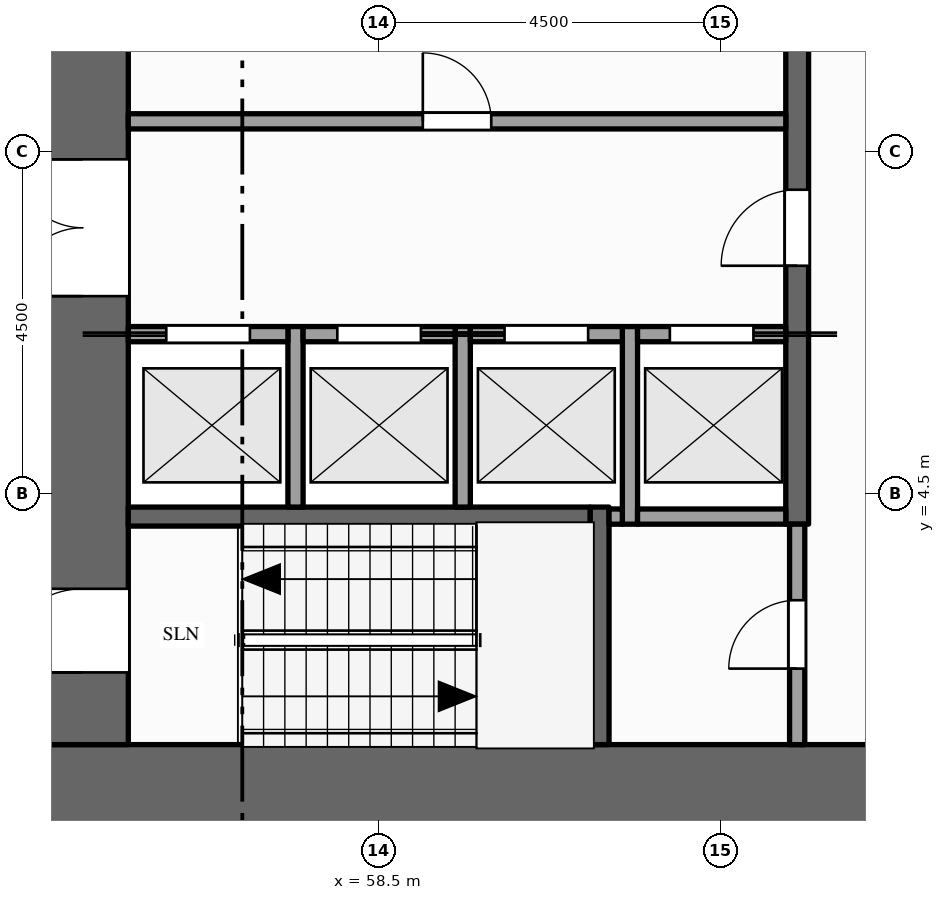
"""IFC4 building model, lengths in metres.
Left out: names, types, materials, properties, quantities, classifications, styles, units other than length and angle.
Written with IfcOpenShell. Run it as: python <this file> out.ifc"""

import sys

from ifc_helpers import new_model, si_unit, direction, frame, frame_2d, origin, place, context, subcontext, project, spatial, rectangle, extrude, element, fill, save


model = new_model("IFC4")
c1 = context("Model", 3, precision=1e-05, world=origin(), true_north=direction((0.0, 1.0)))
c2 = subcontext(c1, "Body", "Model", "MODEL_VIEW")
j1 = project(units=[si_unit("LENGTHUNIT", "METRE"), si_unit("PLANEANGLEUNIT", "RADIAN")], contexts=[c1])
p1 = place(None, origin())
s1 = spatial("IfcSite", under=j1, at=p1, CompositionType="ELEMENT")
p2 = place(p1, origin())
s2 = spatial("IfcBuilding", under=s1, at=p2, CompositionType="ELEMENT")
p3 = place(p2, frame((0.0, 0.0, 107.0)))
s3 = spatial("IfcBuildingStorey", under=s2, at=p3, CompositionType="ELEMENT", Elevation=107.0)
p4 = place(p3, frame((67.5, 0.6, -0.15), z_axis=(0.0, 0.0, 1.0), x_axis=(-1.0, 0.0, 0.0)))
e1 = element("IfcWall", 1, at=p4, inside=s3, PredefinedType="SHEAR", context=c2, shape_type="SweptSolid", body=[
    extrude(rectangle(XDim=13.5, YDim=1.2, at=frame_2d((6.75, 0.0))), origin(), (0.0, 0.0, 1.0), 4.0),
])
p5 = place(p3, frame((54.6, 1.2, -0.15), z_axis=(0.0, 0.0, 1.0), x_axis=(0.0, 1.0, 0.0)))
e2 = element("IfcWall", 2, at=p5, inside=s3, PredefinedType="SHEAR", context=c2, shape_type="SweptSolid", body=[
    extrude(rectangle(XDim=20.1, YDim=1.2, at=frame_2d((10.05, 0.0))), origin(), (0.0, 0.0, 1.0), 4.0),
])
p6 = place(p5, frame((5.9, 0.0, 0.15)))
e3 = element("IfcOpeningElement", 3, at=p6, cuts=e2, PredefinedType="OPENING", context=c2, shape_type="SweptSolid", body=[
    extrude(rectangle(XDim=1.8, YDim=2.1, at=frame_2d((0.9, 1.05))), frame((0.0, 0.61, 0.0), z_axis=(0.0, -1.0, 0.0), x_axis=(1.0, 0.0, 0.0)), (0.0, 0.0, 1.0), 1.22),
])
p7 = place(p5, frame((11.95, 0.0, 0.15)))
e4 = element("IfcOpeningElement", 4, at=p7, cuts=e2, PredefinedType="OPENING", context=c2, shape_type="SweptSolid", body=[
    extrude(rectangle(XDim=1.1, YDim=2.1, at=frame_2d((0.55, 1.05))), frame((0.0, 0.61, 0.0), z_axis=(0.0, -1.0, 0.0), x_axis=(1.0, 0.0, 0.0)), (0.0, 0.0, 1.0), 1.22),
])
p8 = place(p5, frame((0.95, 0.0, 0.15)))
e5 = element("IfcOpeningElement", 5, at=p8, cuts=e2, PredefinedType="OPENING", context=c2, shape_type="SweptSolid", body=[
    extrude(rectangle(XDim=1.1, YDim=2.1, at=frame_2d((0.55, 1.05))), frame((0.0, 0.61, 0.0), z_axis=(0.0, -1.0, 0.0), x_axis=(1.0, 0.0, 0.0)), (0.0, 0.0, 1.0), 1.22),
])
p9 = place(p5, frame((18.15, 0.0, 0.15)))
e6 = element("IfcOpeningElement", 6, at=p9, cuts=e2, PredefinedType="OPENING", context=c2, shape_type="SweptSolid", body=[
    extrude(rectangle(XDim=1.1, YDim=2.1, at=frame_2d((0.55, 1.05))), frame((0.0, 0.61, 0.0), z_axis=(0.0, -1.0, 0.0), x_axis=(1.0, 0.0, 0.0)), (0.0, 0.0, 1.0), 1.22),
])
for number, where, z_axis, x_axis in (
    (7, (57.4, 4.325, 0.0), (0.0, 0.0, 1.0), (0.0, 1.0, 0.0)),
    (8, (59.6, 4.325, 0.0), (0.0, 0.0, 1.0), (0.0, 1.0, 0.0)),
):
    element("IfcWall", number, at=place(p3, frame(where, z_axis=z_axis, x_axis=x_axis)), inside=s3, PredefinedType="SOLIDWALL", context=c2, shape_type="SweptSolid", body=[
        extrude(rectangle(XDim=2.375, YDim=0.2, at=frame_2d((1.188, 0.0))), origin(), (0.0, 0.0, 1.0), 3.85),
    ])
p10 = place(p3, frame((61.4, 1.2, 0.0), z_axis=(0.0, 0.0, 1.0), x_axis=(0.0, 1.0, 0.0)))
e9 = element("IfcWall", 9, at=p10, inside=s3, PredefinedType="SHEAR", context=c2, shape_type="SweptSolid", body=[
    extrude(rectangle(XDim=3.125, YDim=0.25, at=frame_2d((1.562, 0.0))), origin(), (0.0, 0.0, 1.0), 3.85),
])
p11 = place(p3, frame((61.8, 4.1, 0.0), z_axis=(0.0, 0.0, 1.0), x_axis=(0.0, 1.0, 0.0)))
e10 = element("IfcWall", 10, at=p11, inside=s3, PredefinedType="SOLIDWALL", context=c2, shape_type="SweptSolid", body=[
    extrude(rectangle(XDim=2.6, YDim=0.2, at=frame_2d((1.3, 0.0))), origin(), (0.0, 0.0, 1.0), 3.85),
])
p12 = place(p3, frame((64.0, 1.2, 0.0), z_axis=(0.0, 0.0, 1.0), x_axis=(0.0, 1.0, 0.0)))
e11 = element("IfcWall", 11, at=p12, inside=s3, PredefinedType="PARTITIONING", context=c2, shape_type="SweptSolid", body=[
    extrude(rectangle(XDim=2.9, YDim=0.2, at=frame_2d((1.45, 0.0))), origin(), (0.0, 0.0, 1.0), 3.85),
])
p13 = place(p12, frame((1.0, 0.0, 0.0)))
e12 = element("IfcOpeningElement", 12, at=p13, cuts=e11, PredefinedType="OPENING", context=c2, shape_type="SweptSolid", body=[
    extrude(rectangle(XDim=0.9, YDim=2.1, at=frame_2d((0.45, 1.05))), frame((0.0, 0.11, 0.0), z_axis=(0.0, -1.0, 0.0), x_axis=(1.0, 0.0, 0.0)), (0.0, 0.0, 1.0), 0.22),
])
p14 = place(p3, frame((64.0, 4.1, 0.0), z_axis=(0.0, 0.0, 1.0), x_axis=(0.0, 1.0, 0.0)))
e13 = element("IfcWall", 13, at=p14, inside=s3, PredefinedType="SHEAR", context=c2, shape_type="SweptSolid", body=[
    extrude(rectangle(XDim=14.5, YDim=0.3, at=frame_2d((7.25, 0.0))), origin(), (0.0, 0.0, 1.0), 3.85),
])
p15 = place(p14, frame((3.4, 0.0, 0.0)))
e14 = element("IfcOpeningElement", 14, at=p15, cuts=e13, PredefinedType="OPENING", context=c2, shape_type="SweptSolid", body=[
    extrude(rectangle(XDim=1.0, YDim=2.1, at=frame_2d((0.5, 1.05))), frame((0.0, 0.16, 0.0), z_axis=(0.0, -1.0, 0.0), x_axis=(1.0, 0.0, 0.0)), (0.0, 0.0, 1.0), 0.32),
])
p16 = place(p14, frame((9.1, 0.0, 0.0)))
e15 = element("IfcOpeningElement", 15, at=p16, cuts=e13, PredefinedType="OPENING", context=c2, shape_type="SweptSolid", body=[
    extrude(rectangle(XDim=1.0, YDim=2.1, at=frame_2d((0.5, 1.05))), frame((0.0, 0.16, 0.0), z_axis=(0.0, -1.0, 0.0), x_axis=(1.0, 0.0, 0.0)), (0.0, 0.0, 1.0), 0.32),
])
p17 = place(p3, frame((55.2, 4.2, 0.0), z_axis=(0.0, 0.0, 1.0), x_axis=(1.0, 0.0, 0.0)))
e16 = element("IfcWall", 16, at=p17, inside=s3, PredefinedType="SHEAR", context=c2, shape_type="SweptSolid", body=[
    extrude(rectangle(XDim=6.075, YDim=0.25, at=frame_2d((3.038, 0.0))), origin(), (0.0, 0.0, 1.0), 3.85),
])
p18 = place(p3, frame((61.525, 4.2, 0.0), z_axis=(0.0, 0.0, 1.0), x_axis=(1.0, 0.0, 0.0)))
e17 = element("IfcWall", 17, at=p18, inside=s3, PredefinedType="SOLIDWALL", context=c2, shape_type="SweptSolid", body=[
    extrude(rectangle(XDim=0.175, YDim=0.2, at=frame_2d((0.087, 0.0))), origin(), (0.0, 0.0, 1.0), 3.85),
])
p19 = place(p3, frame((61.9, 4.2, 0.0), z_axis=(0.0, 0.0, 1.0), x_axis=(1.0, 0.0, 0.0)))
e18 = element("IfcWall", 18, at=p19, inside=s3, PredefinedType="SOLIDWALL", context=c2, shape_type="SweptSolid", body=[
    extrude(rectangle(XDim=1.95, YDim=0.2, at=frame_2d((0.975, 0.0))), origin(), (0.0, 0.0, 1.0), 3.85),
])
p20 = place(p3, frame((55.2, 6.6, 0.0), z_axis=(0.0, 0.0, 1.0), x_axis=(1.0, 0.0, 0.0)))
e19 = element("IfcWall", 19, at=p20, inside=s3, PredefinedType="SOLIDWALL", context=c2, shape_type="SweptSolid", body=[
    extrude(rectangle(XDim=2.1, YDim=0.2, at=frame_2d((1.05, 0.0))), origin(), (0.0, 0.0, 1.0), 3.85),
])
p21 = place(p20, frame((0.5, 0.0, 0.012)))
e20 = element("IfcOpeningElement", 20, at=p21, cuts=e19, PredefinedType="OPENING", context=c2, shape_type="SweptSolid", body=[
    extrude(rectangle(XDim=1.1, YDim=2.1, at=frame_2d((0.55, 1.05))), frame((0.0, 0.11, 0.0), z_axis=(0.0, -1.0, 0.0), x_axis=(1.0, 0.0, 0.0)), (0.0, 0.0, 1.0), 0.22),
])
p22 = place(p3, frame((57.5, 6.6, 0.0), z_axis=(0.0, 0.0, 1.0), x_axis=(1.0, 0.0, 0.0)))
e21 = element("IfcWall", 21, at=p22, inside=s3, PredefinedType="SOLIDWALL", context=c2, shape_type="SweptSolid", body=[
    extrude(rectangle(XDim=2.0, YDim=0.2, at=frame_2d((1.0, 0.0))), origin(), (0.0, 0.0, 1.0), 3.85),
])
p23 = place(p22, frame((0.45, 0.0, 0.012)))
e22 = element("IfcOpeningElement", 22, at=p23, cuts=e21, PredefinedType="OPENING", context=c2, shape_type="SweptSolid", body=[
    extrude(rectangle(XDim=1.1, YDim=2.1, at=frame_2d((0.55, 1.05))), frame((0.0, 0.11, 0.0), z_axis=(0.0, -1.0, 0.0), x_axis=(1.0, 0.0, 0.0)), (0.0, 0.0, 1.0), 0.22),
])
p24 = place(p3, frame((59.7, 6.6, 0.0), z_axis=(0.0, 0.0, 1.0), x_axis=(1.0, 0.0, 0.0)))
e23 = element("IfcWall", 23, at=p24, inside=s3, PredefinedType="SOLIDWALL", context=c2, shape_type="SweptSolid", body=[
    extrude(rectangle(XDim=2.0, YDim=0.2, at=frame_2d((1.0, 0.0))), origin(), (0.0, 0.0, 1.0), 3.85),
])
p25 = place(p24, frame((0.45, 0.0, 0.012)))
e24 = element("IfcOpeningElement", 24, at=p25, cuts=e23, PredefinedType="OPENING", context=c2, shape_type="SweptSolid", body=[
    extrude(rectangle(XDim=1.1, YDim=2.1, at=frame_2d((0.55, 1.05))), frame((0.0, 0.11, 0.0), z_axis=(0.0, -1.0, 0.0), x_axis=(1.0, 0.0, 0.0)), (0.0, 0.0, 1.0), 0.22),
])
p26 = place(p3, frame((61.9, 6.6, 0.0), z_axis=(0.0, 0.0, 1.0), x_axis=(1.0, 0.0, 0.0)))
e25 = element("IfcWall", 25, at=p26, inside=s3, PredefinedType="SOLIDWALL", context=c2, shape_type="SweptSolid", body=[
    extrude(rectangle(XDim=1.95, YDim=0.2, at=frame_2d((0.975, 0.0))), origin(), (0.0, 0.0, 1.0), 3.85),
])
p27 = place(p26, frame((0.425, 0.0, 0.012)))
e26 = element("IfcOpeningElement", 26, at=p27, cuts=e25, PredefinedType="OPENING", context=c2, shape_type="SweptSolid", body=[
    extrude(rectangle(XDim=1.1, YDim=2.1, at=frame_2d((0.55, 1.05))), frame((0.0, 0.11, 0.0), z_axis=(0.0, -1.0, 0.0), x_axis=(1.0, 0.0, 0.0)), (0.0, 0.0, 1.0), 0.22),
])
p28 = place(p3, frame((55.2, 9.4, 0.0), z_axis=(0.0, 0.0, 1.0), x_axis=(1.0, 0.0, 0.0)))
e27 = element("IfcWall", 27, at=p28, inside=s3, PredefinedType="PARTITIONING", context=c2, shape_type="SweptSolid", body=[
    extrude(rectangle(XDim=8.65, YDim=0.2, at=frame_2d((4.325, 0.0))), origin(), (0.0, 0.0, 1.0), 3.85),
])
p29 = place(p28, frame((3.875, 0.0, 0.0)))
e28 = element("IfcOpeningElement", 28, at=p29, cuts=e27, PredefinedType="OPENING", context=c2, shape_type="SweptSolid", body=[
    extrude(rectangle(XDim=0.9, YDim=2.1, at=frame_2d((0.45, 1.05))), frame((0.0, 0.11, 0.0), z_axis=(0.0, -1.0, 0.0), x_axis=(1.0, 0.0, 0.0)), (0.0, 0.0, 1.0), 0.22),
])
p30 = place(p21, origin())
e29 = element("IfcDoor", 29, at=p30, inside=s3, OperationType="SLIDING_TO_LEFT", PredefinedType="DOOR", context=c2, shape_type="SweptSolid", body=[
    extrude(rectangle(XDim=1.1, YDim=2.1, at=frame_2d((0.55, 1.05))), frame((0.0, 0.025, 0.0), z_axis=(0.0, -1.0, 0.0), x_axis=(1.0, 0.0, 0.0)), (0.0, 0.0, 1.0), 0.05),
])
fill(e20, e29)
p31 = place(p23, origin())
e30 = element("IfcDoor", 30, at=p31, inside=s3, OperationType="SLIDING_TO_RIGHT", PredefinedType="DOOR", context=c2, shape_type="SweptSolid", body=[
    extrude(rectangle(XDim=1.1, YDim=2.1, at=frame_2d((0.55, 1.05))), frame((0.0, 0.025, 0.0), z_axis=(0.0, -1.0, 0.0), x_axis=(1.0, 0.0, 0.0)), (0.0, 0.0, 1.0), 0.05),
])
fill(e22, e30)
p32 = place(p25, origin())
e31 = element("IfcDoor", 31, at=p32, inside=s3, OperationType="SLIDING_TO_LEFT", PredefinedType="DOOR", context=c2, shape_type="SweptSolid", body=[
    extrude(rectangle(XDim=1.1, YDim=2.1, at=frame_2d((0.55, 1.05))), frame((0.0, 0.025, 0.0), z_axis=(0.0, -1.0, 0.0), x_axis=(1.0, 0.0, 0.0)), (0.0, 0.0, 1.0), 0.05),
])
fill(e24, e31)
p33 = place(p27, origin())
e32 = element("IfcDoor", 32, at=p33, inside=s3, OperationType="SLIDING_TO_RIGHT", PredefinedType="DOOR", context=c2, shape_type="SweptSolid", body=[
    extrude(rectangle(XDim=1.1, YDim=2.1, at=frame_2d((0.55, 1.05))), frame((0.0, 0.025, 0.0), z_axis=(0.0, -1.0, 0.0), x_axis=(1.0, 0.0, 0.0)), (0.0, 0.0, 1.0), 0.05),
])
fill(e26, e32)
p34 = place(p6, origin())
e33 = element("IfcDoor", 33, at=p34, inside=s3, OperationType="DOUBLE_DOOR_SINGLE_SWING", PredefinedType="DOOR", context=c2, shape_type="SweptSolid", body=[
    extrude(rectangle(XDim=1.8, YDim=2.1, at=frame_2d((0.9, 1.05))), frame((0.0, 0.025, 0.0), z_axis=(0.0, -1.0, 0.0), x_axis=(1.0, 0.0, 0.0)), (0.0, 0.0, 1.0), 0.05),
])
fill(e3, e33)
p35 = place(p15, origin())
e34 = element("IfcDoor", 34, at=p35, inside=s3, OperationType="SINGLE_SWING_LEFT", PredefinedType="DOOR", context=c2, shape_type="SweptSolid", body=[
    extrude(rectangle(XDim=1.0, YDim=2.1, at=frame_2d((0.5, 1.05))), frame((0.0, 0.025, 0.0), z_axis=(0.0, -1.0, 0.0), x_axis=(1.0, 0.0, 0.0)), (0.0, 0.0, 1.0), 0.05),
])
fill(e14, e34)
p36 = place(p8, origin())
e35 = element("IfcDoor", 35, at=p36, inside=s3, OperationType="SINGLE_SWING_LEFT", PredefinedType="DOOR", context=c2, shape_type="SweptSolid", body=[
    extrude(rectangle(XDim=1.1, YDim=2.1, at=frame_2d((0.55, 1.05))), frame((0.0, 0.025, 0.0), z_axis=(0.0, -1.0, 0.0), x_axis=(1.0, 0.0, 0.0)), (0.0, 0.0, 1.0), 0.05),
])
fill(e5, e35)
p37 = place(p13, origin())
e36 = element("IfcDoor", 36, at=p37, inside=s3, OperationType="SINGLE_SWING_LEFT", PredefinedType="DOOR", context=c2, shape_type="SweptSolid", body=[
    extrude(rectangle(XDim=0.9, YDim=2.1, at=frame_2d((0.45, 1.05))), frame((0.0, 0.025, 0.0), z_axis=(0.0, -1.0, 0.0), x_axis=(1.0, 0.0, 0.0)), (0.0, 0.0, 1.0), 0.05),
])
fill(e12, e36)
p38 = place(p29, origin())
e37 = element("IfcDoor", 37, at=p38, inside=s3, OperationType="SINGLE_SWING_LEFT", PredefinedType="DOOR", context=c2, shape_type="SweptSolid", body=[
    extrude(rectangle(XDim=0.9, YDim=2.1, at=frame_2d((0.45, 1.05))), frame((0.0, 0.025, 0.0), z_axis=(0.0, -1.0, 0.0), x_axis=(1.0, 0.0, 0.0)), (0.0, 0.0, 1.0), 0.05),
])
fill(e28, e37)
save(model, sys.argv[1])
